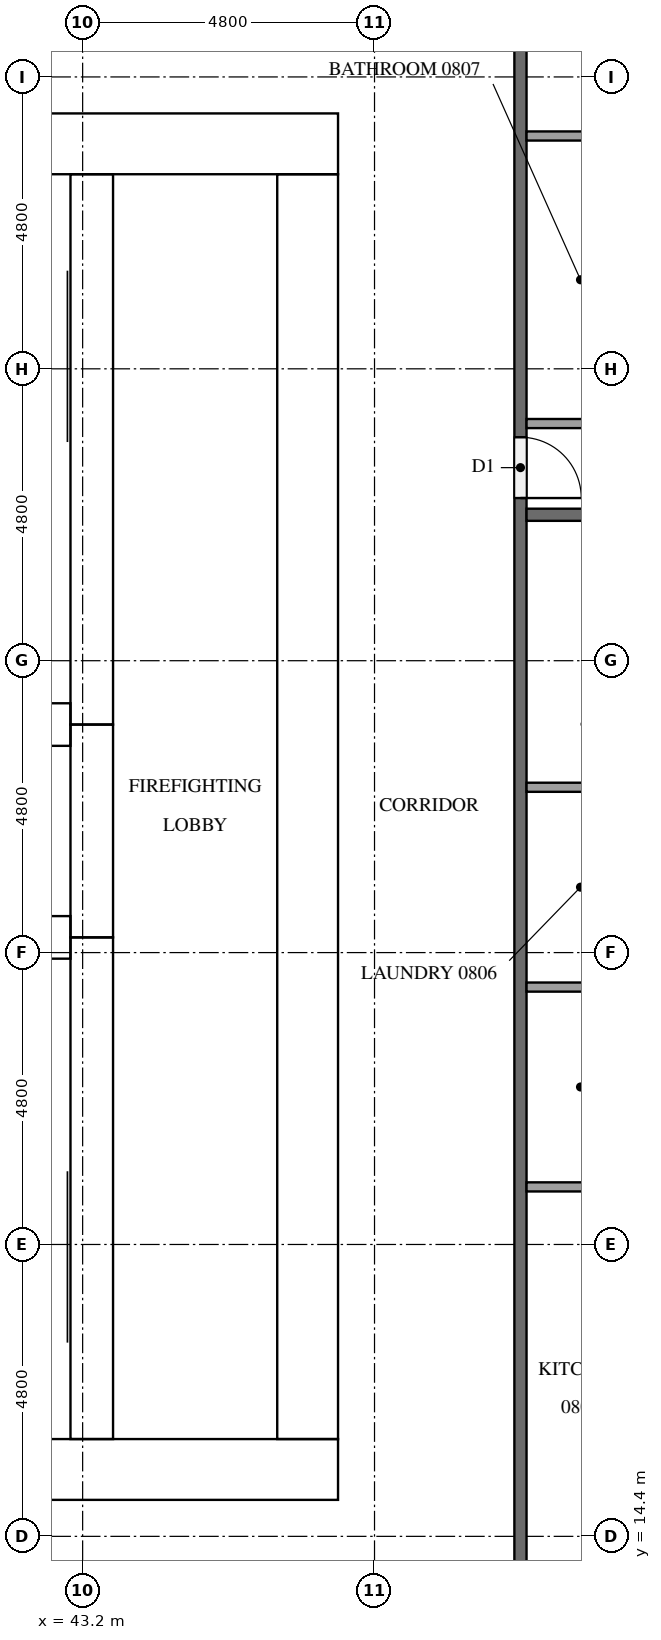
"""IFC4 building model, lengths in metres.
Left out: names, types, materials, properties, quantities, classifications, styles, units other than length and angle.
Written with IfcOpenShell. Run it as: python <this file> out.ifc"""

import sys

from ifc_helpers import new_model, si_unit, direction, frame, frame_2d, origin, place, context, subcontext, project, spatial, rectangle, extrude, element, fill, save


model = new_model("IFC4")
c1 = context("Model", 3, precision=1e-05, world=origin(), true_north=direction((0.0, 1.0)))
c2 = subcontext(c1, "Body", "Model", "MODEL_VIEW")
j1 = project(units=[si_unit("LENGTHUNIT", "METRE"), si_unit("PLANEANGLEUNIT", "RADIAN")], contexts=[c1])
p1 = place(None, origin())
s1 = spatial("IfcSite", under=j1, at=p1, CompositionType="ELEMENT")
p2 = place(p1, origin())
s2 = spatial("IfcBuilding", under=s1, at=p2, CompositionType="ELEMENT")
p3 = place(p2, frame((0.0, 0.0, 36.4)))
s3 = spatial("IfcBuildingStorey", under=s2, at=p3, CompositionType="ELEMENT", Elevation=36.4)
p4 = place(p3, frame((15.0, 15.5, 0.0), z_axis=(0.0, 0.0, 1.0), x_axis=(1.0, 0.0, 0.0)))
e1 = element("IfcWall", 1, at=p4, inside=s3, PredefinedType="SHEAR", context=c2, shape_type="SweptSolid", body=[
    extrude(rectangle(XDim=32.4, YDim=1.0, at=frame_2d((16.2, 0.0))), origin(), (0.0, 0.0, 1.0), 3.2),
])
p5 = place(p4, frame((15.3, 0.0, 0.0)))
e2 = element("IfcOpeningElement", 2, at=p5, cuts=e1, PredefinedType="OPENING", context=c2, shape_type="SweptSolid", body=[
    extrude(rectangle(XDim=1.8, YDim=2.1, at=frame_2d((0.9, 1.05))), frame((0.0, 0.51, 0.0), z_axis=(0.0, -1.0, 0.0), x_axis=(1.0, 0.0, 0.0)), (0.0, 0.0, 1.0), 1.02),
])
p6 = place(p3, frame((15.0, 37.3, 0.0), z_axis=(0.0, 0.0, 1.0), x_axis=(1.0, 0.0, 0.0)))
e3 = element("IfcWall", 3, at=p6, inside=s3, PredefinedType="SHEAR", context=c2, shape_type="SweptSolid", body=[
    extrude(rectangle(XDim=32.4, YDim=1.0, at=frame_2d((16.2, 0.0))), origin(), (0.0, 0.0, 1.0), 3.2),
])
p7 = place(p6, frame((15.3, 0.0, 0.0)))
e4 = element("IfcOpeningElement", 4, at=p7, cuts=e3, PredefinedType="OPENING", context=c2, shape_type="SweptSolid", body=[
    extrude(rectangle(XDim=1.8, YDim=2.1, at=frame_2d((0.9, 1.05))), frame((0.0, 0.51, 0.0), z_axis=(0.0, -1.0, 0.0), x_axis=(1.0, 0.0, 0.0)), (0.0, 0.0, 1.0), 1.02),
])
p8 = place(p6, frame((1.766, 0.0, 0.0)))
e5 = element("IfcOpeningElement", 5, at=p8, cuts=e3, PredefinedType="OPENING", context=c2, shape_type="SweptSolid", body=[
    extrude(rectangle(XDim=1.0, YDim=2.1, at=frame_2d((0.5, 1.05))), frame((0.0, 0.51, 0.0), z_axis=(0.0, -1.0, 0.0), x_axis=(1.0, 0.0, 0.0)), (0.0, 0.0, 1.0), 1.02),
])
p9 = place(p6, frame((5.241, 0.0, 0.0)))
e6 = element("IfcOpeningElement", 6, at=p9, cuts=e3, PredefinedType="OPENING", context=c2, shape_type="SweptSolid", body=[
    extrude(rectangle(XDim=1.0, YDim=2.1, at=frame_2d((0.5, 1.05))), frame((0.0, 0.51, 0.0), z_axis=(0.0, -1.0, 0.0), x_axis=(1.0, 0.0, 0.0)), (0.0, 0.0, 1.0), 1.02),
])
p10 = place(p3, frame((46.9, 16.0, 0.0), z_axis=(0.0, 0.0, 1.0), x_axis=(0.0, 1.0, 0.0)))
e7 = element("IfcWall", 7, at=p10, inside=s3, PredefinedType="SHEAR", context=c2, shape_type="SweptSolid", body=[
    extrude(rectangle(XDim=20.8, YDim=1.0, at=frame_2d((10.4, 0.0))), origin(), (0.0, 0.0, 1.0), 3.2),
])
p11 = place(p10, frame((10.1, 0.0, 0.0)))
e8 = element("IfcOpeningElement", 8, at=p11, cuts=e7, PredefinedType="OPENING", context=c2, shape_type="SweptSolid", body=[
    extrude(rectangle(XDim=1.2, YDim=2.1, at=frame_2d((0.6, 1.05))), frame((0.0, 0.51, 0.0), z_axis=(0.0, -1.0, 0.0), x_axis=(1.0, 0.0, 0.0)), (0.0, 0.0, 1.0), 1.02),
])
p12 = place(p3, frame((43.35, 16.0, 0.0), z_axis=(0.0, 0.0, 1.0), x_axis=(0.0, 1.0, 0.0)))
e9 = element("IfcWall", 9, at=p12, inside=s3, PredefinedType="SHEAR", context=c2, shape_type="SweptSolid", body=[
    extrude(rectangle(XDim=8.25, YDim=0.7, at=frame_2d((4.125, 0.0))), origin(), (0.0, 0.0, 1.0), 3.2),
])
p13 = place(p12, frame((0.2, 0.0, 0.0)))
e10 = element("IfcOpeningElement", 10, at=p13, cuts=e9, PredefinedType="OPENING", context=c2, shape_type="SweptSolid", body=[
    extrude(rectangle(XDim=1.2, YDim=2.1, at=frame_2d((0.6, 1.05))), frame((0.0, 0.36, 0.0), z_axis=(0.0, -1.0, 0.0), x_axis=(1.0, 0.0, 0.0)), (0.0, 0.0, 1.0), 0.72),
])
p14 = place(p3, frame((43.35, 24.25, 0.0), z_axis=(0.0, 0.0, 1.0), x_axis=(0.0, 1.0, 0.0)))
e11 = element("IfcWall", 11, at=p14, inside=s3, PredefinedType="SHEAR", context=c2, shape_type="SweptSolid", body=[
    extrude(rectangle(XDim=3.5, YDim=0.7, at=frame_2d((1.75, 0.0))), origin(), (0.0, 0.0, 1.0), 3.2),
])
p15 = place(p14, frame((1.2, 0.0, 0.0)))
e12 = element("IfcOpeningElement", 12, at=p15, cuts=e11, PredefinedType="OPENING", context=c2, shape_type="SweptSolid", body=[
    extrude(rectangle(XDim=1.1, YDim=2.1, at=frame_2d((0.55, 1.05))), frame((0.0, 0.36, 0.0), z_axis=(0.0, -1.0, 0.0), x_axis=(1.0, 0.0, 0.0)), (0.0, 0.0, 1.0), 0.72),
])
p16 = place(p3, frame((43.35, 27.75, 0.0), z_axis=(0.0, 0.0, 1.0), x_axis=(0.0, 1.0, 0.0)))
e13 = element("IfcWall", 13, at=p16, inside=s3, PredefinedType="SHEAR", context=c2, shape_type="SweptSolid", body=[
    extrude(rectangle(XDim=9.05, YDim=0.7, at=frame_2d((4.525, 0.0))), origin(), (0.0, 0.0, 1.0), 3.2),
])
p17 = place(p16, frame((7.65, 0.0, 0.0)))
e14 = element("IfcOpeningElement", 14, at=p17, cuts=e13, PredefinedType="OPENING", context=c2, shape_type="SweptSolid", body=[
    extrude(rectangle(XDim=1.2, YDim=2.1, at=frame_2d((0.6, 1.05))), frame((0.0, 0.36, 0.0), z_axis=(0.0, -1.0, 0.0), x_axis=(1.0, 0.0, 0.0)), (0.0, 0.0, 1.0), 0.72),
])
for number, where, z_axis, x_axis in (
    (15, (39.65, 24.25, 0.0), (0.0, 0.0, 1.0), (1.0, 0.0, 0.0)),
    (16, (39.65, 27.75, 0.0), (0.0, 0.0, 1.0), (1.0, 0.0, 0.0)),
):
    element("IfcWall", number, at=place(p3, frame(where, z_axis=z_axis, x_axis=x_axis)), inside=s3, PredefinedType="SHEAR", context=c2, shape_type="SweptSolid", body=[
        extrude(rectangle(XDim=3.35, YDim=0.7, at=frame_2d((1.675, 0.0))), origin(), (0.0, 0.0, 1.0), 3.2),
    ])
p18 = place(p3, frame((50.4, 40.7, 0.0), z_axis=(0.0, 0.0, 1.0), x_axis=(0.0, -1.0, 0.0)))
e17 = element("IfcWall", 17, at=p18, inside=s3, PredefinedType="PARTITIONING", context=c2, shape_type="SweptSolid", body=[
    extrude(rectangle(XDim=28.6, YDim=0.2, at=frame_2d((14.3, 0.0))), origin(), (0.0, 0.0, 1.0), 3.2),
])
p19 = place(p18, frame((27.375, 0.0, 0.0)))
e18 = element("IfcOpeningElement", 18, at=p19, cuts=e17, PredefinedType="OPENING", context=c2, shape_type="SweptSolid", body=[
    extrude(rectangle(XDim=1.1, YDim=2.1, at=frame_2d((0.55, 1.05))), frame((0.0, 0.11, 0.0), z_axis=(0.0, -1.0, 0.0), x_axis=(1.0, 0.0, 0.0)), (0.0, 0.0, 1.0), 0.22),
])
p20 = place(p18, frame((8.225, 0.0, 0.0)))
e19 = element("IfcOpeningElement", 19, at=p20, cuts=e17, PredefinedType="OPENING", context=c2, shape_type="SweptSolid", body=[
    extrude(rectangle(XDim=1.0, YDim=2.1, at=frame_2d((0.5, 1.05))), frame((0.0, 0.11, 0.0), z_axis=(0.0, -1.0, 0.0), x_axis=(1.0, 0.0, 0.0)), (0.0, 0.0, 1.0), 0.22),
])
p21 = place(p3, frame((50.5, 31.2, 0.0), z_axis=(0.0, 0.0, 1.0), x_axis=(1.0, 0.0, 0.0)))
e20 = element("IfcWall", 20, at=p21, inside=s3, PredefinedType="PARTITIONING", context=c2, shape_type="SweptSolid", body=[
    extrude(rectangle(XDim=7.0, YDim=0.2, at=frame_2d((3.5, 0.0))), origin(), (0.0, 0.0, 1.0), 3.2),
])
for number, where, z_axis, x_axis in (
    (21, (50.5, 20.147, 0.0), (0.0, 0.0, 1.0), (1.0, 0.0, 0.0)),
    (22, (50.5, 23.433, 0.0), (0.0, 0.0, 1.0), (1.0, 0.0, 0.0)),
    (23, (50.5, 26.719, 0.0), (0.0, 0.0, 1.0), (1.0, 0.0, 0.0)),
    (24, (50.5, 37.429, 0.0), (0.0, 0.0, 1.0), (1.0, 0.0, 0.0)),
):
    element("IfcWall", number, at=place(p3, frame(where, z_axis=z_axis, x_axis=x_axis)), inside=s3, PredefinedType="PARTITIONING", context=c2, shape_type="SweptSolid", body=[
        extrude(rectangle(XDim=1.775, YDim=0.15, at=frame_2d((0.887, 0.0))), origin(), (0.0, 0.0, 1.0), 3.2),
    ])
p22 = place(p3, frame((50.5, 32.7, 0.0), z_axis=(0.0, 0.0, 1.0), x_axis=(1.0, 0.0, 0.0)))
e25 = element("IfcWall", 25, at=p22, inside=s3, PredefinedType="PARTITIONING", context=c2, shape_type="SweptSolid", body=[
    extrude(rectangle(XDim=1.925, YDim=0.15, at=frame_2d((0.962, 0.0))), origin(), (0.0, 0.0, 1.0), 3.2),
])
p23 = place(p15, origin())
e26 = element("IfcDoor", 26, at=p23, inside=s3, OperationType="DOUBLE_DOOR_SLIDING", PredefinedType="DOOR", context=c2, shape_type="SweptSolid", body=[
    extrude(rectangle(XDim=1.1, YDim=2.1, at=frame_2d((0.55, 1.05))), frame((0.0, 0.025, 0.0), z_axis=(0.0, -1.0, 0.0), x_axis=(1.0, 0.0, 0.0)), (0.0, 0.0, 1.0), 0.05),
])
fill(e12, e26)
p24 = place(p13, origin())
e27 = element("IfcDoor", 27, at=p24, inside=s3, OperationType="SINGLE_SWING_LEFT", PredefinedType="DOOR", context=c2, shape_type="SweptSolid", body=[
    extrude(rectangle(XDim=1.2, YDim=2.1, at=frame_2d((0.6, 1.05))), frame((0.0, 0.025, 0.0), z_axis=(0.0, -1.0, 0.0), x_axis=(1.0, 0.0, 0.0)), (0.0, 0.0, 1.0), 0.05),
])
fill(e10, e27)
p25 = place(p17, origin())
e28 = element("IfcDoor", 28, at=p25, inside=s3, OperationType="SINGLE_SWING_RIGHT", PredefinedType="DOOR", context=c2, shape_type="SweptSolid", body=[
    extrude(rectangle(XDim=1.2, YDim=2.1, at=frame_2d((0.6, 1.05))), frame((0.0, 0.025, 0.0), z_axis=(0.0, -1.0, 0.0), x_axis=(1.0, 0.0, 0.0)), (0.0, 0.0, 1.0), 0.05),
])
fill(e14, e28)
p26 = place(p11, origin())
e29 = element("IfcDoor", 29, at=p26, inside=s3, OperationType="SINGLE_SWING_RIGHT", PredefinedType="DOOR", context=c2, shape_type="SweptSolid", body=[
    extrude(rectangle(XDim=1.2, YDim=2.1, at=frame_2d((0.6, 1.05))), frame((0.0, 0.025, 0.0), z_axis=(0.0, -1.0, 0.0), x_axis=(1.0, 0.0, 0.0)), (0.0, 0.0, 1.0), 0.05),
])
fill(e8, e29)
p27 = place(p20, origin())
e30 = element("IfcDoor", 30, at=p27, inside=s3, OperationType="SINGLE_SWING_RIGHT", PredefinedType="DOOR", context=c2, shape_type="SweptSolid", body=[
    extrude(rectangle(XDim=1.0, YDim=2.1, at=frame_2d((0.5, 1.05))), frame((0.0, 0.025, 0.0), z_axis=(0.0, -1.0, 0.0), x_axis=(1.0, 0.0, 0.0)), (0.0, 0.0, 1.0), 0.05),
])
fill(e19, e30)
save(model, sys.argv[1])
